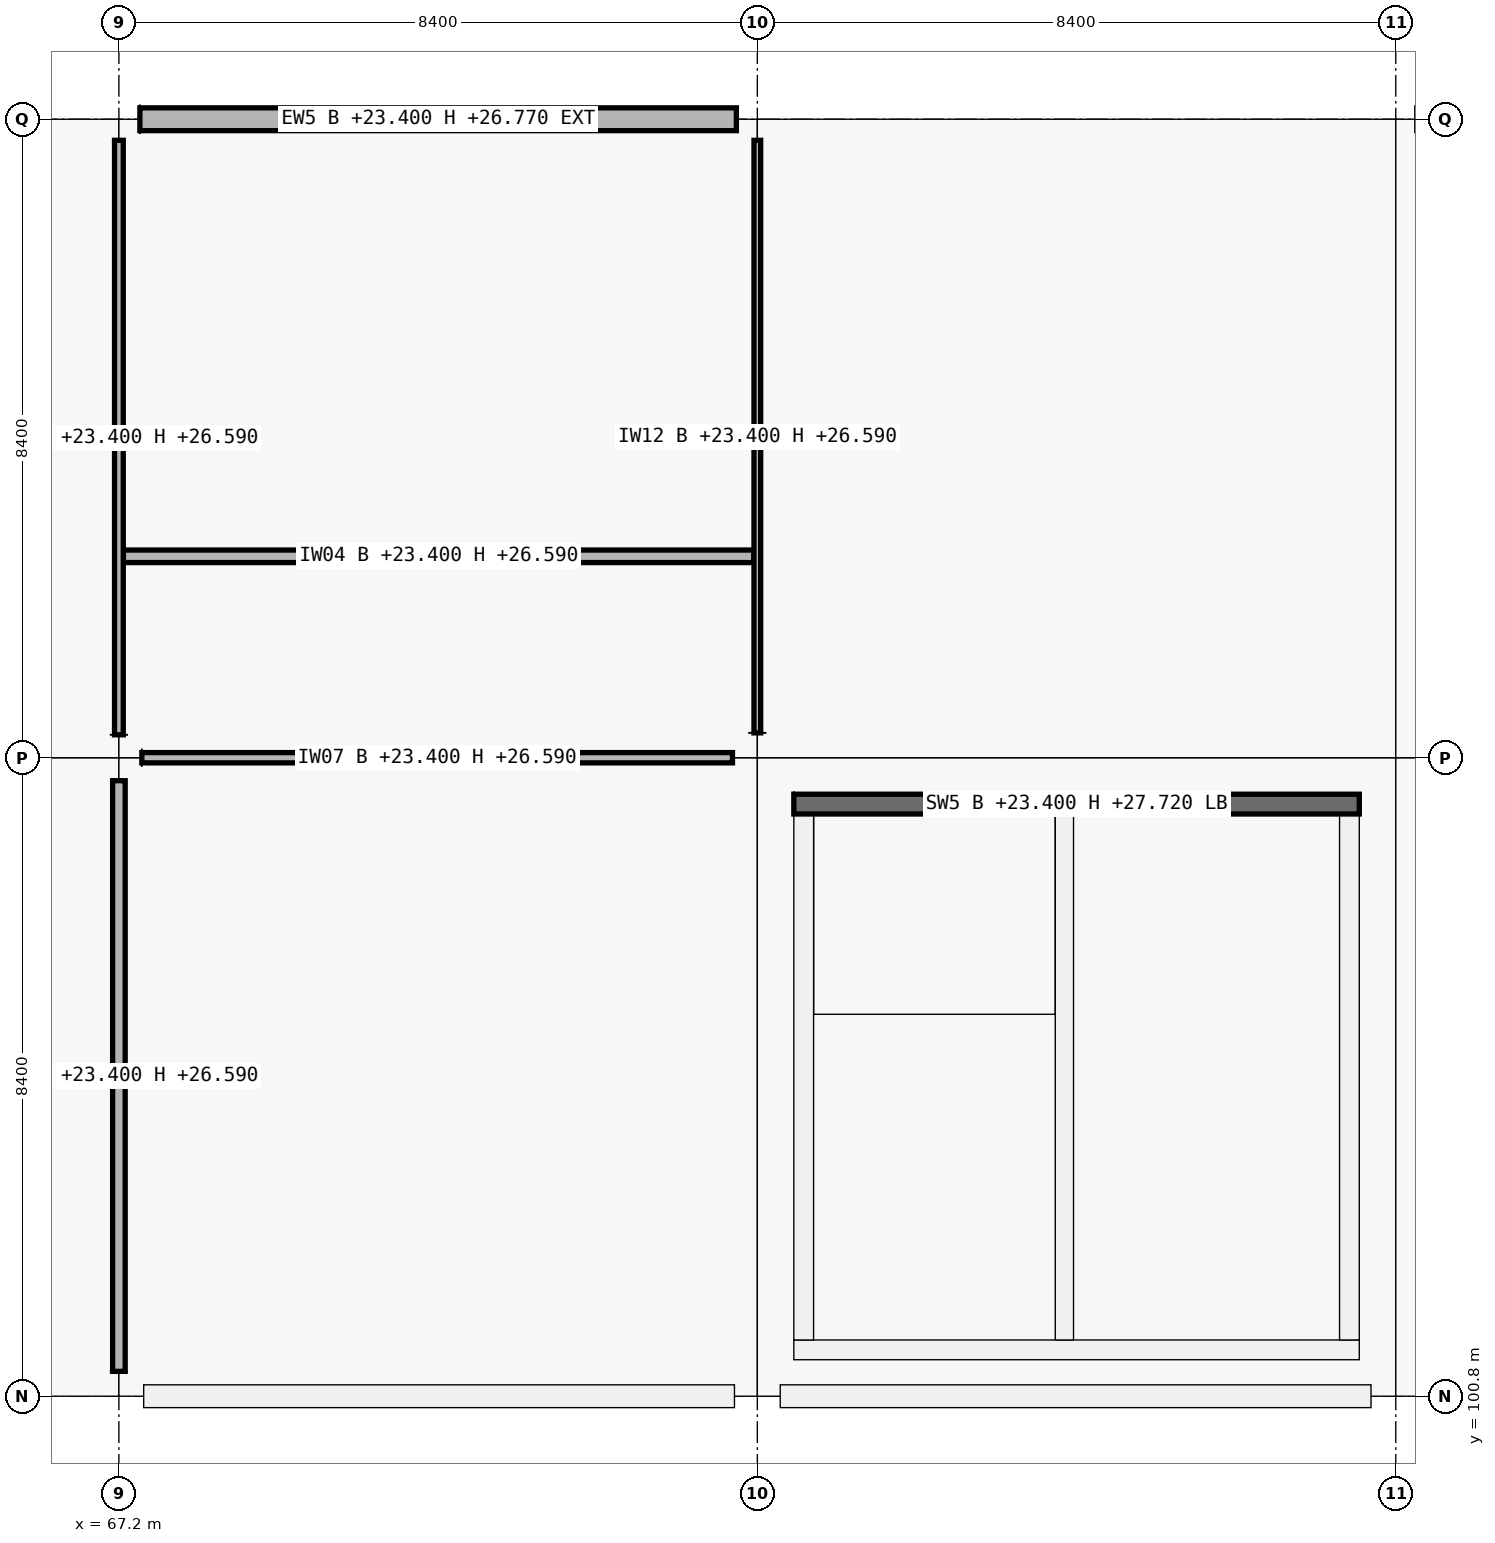
"""IFC4 building model, lengths in metres.
Left out: names, types, materials, properties, quantities, classifications, styles, units other than length and angle.
Written with IfcOpenShell. Run it as: python <this file> out.ifc"""

import sys

from ifc_helpers import new_model, si_unit, direction, frame, frame_2d, origin, origin_2d, place, context, subcontext, project, spatial, rectangle, extrude, element, fill, save


model = new_model("IFC4")
c1 = context("Model", 3, precision=1e-05, world=origin(), true_north=direction((0.0, 1.0)))
c2 = subcontext(c1, "Body", "Model", "MODEL_VIEW")
j1 = project(units=[si_unit("LENGTHUNIT", "METRE"), si_unit("PLANEANGLEUNIT", "RADIAN")], contexts=[c1])
p1 = place(None, origin())
s1 = spatial("IfcSite", under=j1, at=p1, CompositionType="ELEMENT")
p2 = place(p1, origin())
s2 = spatial("IfcBuilding", under=s1, at=p2, CompositionType="ELEMENT")
p3 = place(p2, frame((0.0, 0.0, 23.4)))
s3 = spatial("IfcBuildingStorey", under=s2, at=p3, CompositionType="ELEMENT", Elevation=23.4)
p4 = place(p3, frame((67.2, 100.8, 0.0), z_axis=(0.0, 0.0, 1.0), x_axis=(1.0, 0.0, 0.0)))
e1 = element("IfcColumn", 1, at=p4, inside=s3, PredefinedType="COLUMN", context=c2, shape_type="SweptSolid", body=[
    extrude(rectangle(XDim=0.65, YDim=0.65, at=origin_2d()), origin(), (0.0, 0.0, 1.0), 4.32),
])
p5 = place(p3, frame((67.2, 109.2, 0.0), z_axis=(0.0, 0.0, 1.0), x_axis=(1.0, 0.0, 0.0)))
e2 = element("IfcColumn", 2, at=p5, inside=s3, PredefinedType="COLUMN", context=c2, shape_type="SweptSolid", body=[
    extrude(rectangle(XDim=0.6, YDim=0.6, at=origin_2d()), origin(), (0.0, 0.0, 1.0), 4.32),
])
p6 = place(p3, frame((67.2, 117.6, 0.0), z_axis=(0.0, 0.0, 1.0), x_axis=(1.0, 0.0, 0.0)))
e3 = element("IfcColumn", 3, at=p6, inside=s3, PredefinedType="COLUMN", context=c2, shape_type="SweptSolid", body=[
    extrude(rectangle(XDim=0.55, YDim=0.55, at=origin_2d()), origin(), (0.0, 0.0, 1.0), 4.07),
])
p7 = place(p3, frame((75.6, 100.8, 0.0), z_axis=(0.0, 0.0, 1.0), x_axis=(1.0, 0.0, 0.0)))
e4 = element("IfcColumn", 4, at=p7, inside=s3, PredefinedType="COLUMN", context=c2, shape_type="SweptSolid", body=[
    extrude(rectangle(XDim=0.6, YDim=0.6, at=origin_2d()), origin(), (0.0, 0.0, 1.0), 4.32),
])
p8 = place(p3, frame((75.6, 109.2, 0.0), z_axis=(0.0, 0.0, 1.0), x_axis=(1.0, 0.0, 0.0)))
e5 = element("IfcColumn", 5, at=p8, inside=s3, PredefinedType="COLUMN", context=c2, shape_type="SweptSolid", body=[
    extrude(rectangle(XDim=0.65, YDim=0.65, at=origin_2d()), origin(), (0.0, 0.0, 1.0), 4.32),
])
p9 = place(p3, frame((75.6, 117.6, 0.0), z_axis=(0.0, 0.0, 1.0), x_axis=(1.0, 0.0, 0.0)))
e6 = element("IfcColumn", 6, at=p9, inside=s3, PredefinedType="COLUMN", context=c2, shape_type="SweptSolid", body=[
    extrude(rectangle(XDim=0.55, YDim=0.55, at=origin_2d()), origin(), (0.0, 0.0, 1.0), 4.07),
])
p10 = place(p3, frame((84.0, 100.8, 0.0), z_axis=(0.0, 0.0, 1.0), x_axis=(1.0, 0.0, 0.0)))
e7 = element("IfcColumn", 7, at=p10, inside=s3, PredefinedType="COLUMN", context=c2, shape_type="SweptSolid", body=[
    extrude(rectangle(XDim=0.65, YDim=0.65, at=origin_2d()), origin(), (0.0, 0.0, 1.0), 4.32),
])
p11 = place(p3, frame((84.0, 109.2, 0.0), z_axis=(0.0, 0.0, 1.0), x_axis=(1.0, 0.0, 0.0)))
e8 = element("IfcColumn", 8, at=p11, inside=s3, PredefinedType="COLUMN", context=c2, shape_type="SweptSolid", body=[
    extrude(rectangle(XDim=0.6, YDim=0.6, at=origin_2d()), origin(), (0.0, 0.0, 1.0), 4.32),
])
p12 = place(p3, frame((84.0, 117.6, 0.0), z_axis=(0.0, 0.0, 1.0), x_axis=(1.0, 0.0, 0.0)))
e9 = element("IfcColumn", 9, at=p12, inside=s3, PredefinedType="COLUMN", context=c2, shape_type="SweptSolid", body=[
    extrude(rectangle(XDim=0.55, YDim=0.55, at=origin_2d()), origin(), (0.0, 0.0, 1.0), 4.07),
])
p13 = place(p3, frame((75.299, 100.8, 0.0), z_axis=(0.0, 0.0, 1.0), x_axis=(-1.0, 0.0, 0.0)))
e10 = element("IfcWall", 10, at=p13, inside=s3, PredefinedType="SOLIDWALL", context=c2, shape_type="SweptSolid", body=[
    extrude(rectangle(XDim=7.773, YDim=0.3, at=frame_2d((3.887, 0.0))), origin(), (0.0, 0.0, 1.0), 3.37),
])
p14 = place(p13, frame((2.511, 0.0, 0.9)))
e11 = element("IfcOpeningElement", 11, at=p14, cuts=e10, PredefinedType="OPENING", context=c2, shape_type="SweptSolid", body=[
    extrude(rectangle(XDim=2.75, YDim=1.6, at=frame_2d((1.375, 0.8))), frame((0.0, 0.15, 0.0), z_axis=(0.0, -1.0, 0.0), x_axis=(1.0, 0.0, 0.0)), (0.0, 0.0, 1.0), 0.3),
])
p15 = place(p3, frame((67.476, 117.6, 0.0), z_axis=(0.0, 0.0, 1.0), x_axis=(1.0, 0.0, 0.0)))
e12 = element("IfcWall", 12, at=p15, inside=s3, PredefinedType="SOLIDWALL", context=c2, shape_type="SweptSolid", body=[
    extrude(rectangle(XDim=7.848, YDim=0.3, at=frame_2d((3.924, 0.0))), origin(), (0.0, 0.0, 1.0), 3.37),
])
p16 = place(p15, frame((3.149, 0.0, 0.9)))
e13 = element("IfcOpeningElement", 13, at=p16, cuts=e12, PredefinedType="OPENING", context=c2, shape_type="SweptSolid", body=[
    extrude(rectangle(XDim=1.55, YDim=1.6, at=frame_2d((0.775, 0.8))), frame((0.0, 0.15, 0.0), z_axis=(0.0, -1.0, 0.0), x_axis=(1.0, 0.0, 0.0)), (0.0, 0.0, 1.0), 0.3),
])
p17 = place(p3, frame((83.674, 100.8, 0.0), z_axis=(0.0, 0.0, 1.0), x_axis=(-1.0, 0.0, 0.0)))
e14 = element("IfcWall", 14, at=p17, inside=s3, PredefinedType="SOLIDWALL", context=c2, shape_type="SweptSolid", body=[
    extrude(rectangle(XDim=7.773, YDim=0.3, at=frame_2d((3.887, 0.0))), origin(), (0.0, 0.0, 1.0), 3.37),
])
p18 = place(p3, frame((83.52, 101.41, 0.0), z_axis=(0.0, 0.0, 1.0), x_axis=(-1.0, 0.0, 0.0)))
e15 = element("IfcWall", 15, at=p18, inside=s3, PredefinedType="SHEAR", context=c2, shape_type="SweptSolid", body=[
    extrude(rectangle(XDim=7.44, YDim=0.26, at=frame_2d((3.72, 0.0))), origin(), (0.0, 0.0, 1.0), 4.32),
])
p19 = place(p3, frame((76.21, 101.54, 0.0), z_axis=(0.0, 0.0, 1.0), x_axis=(0.0, 1.0, 0.0)))
e16 = element("IfcWall", 16, at=p19, inside=s3, PredefinedType="SHEAR", context=c2, shape_type="SweptSolid", body=[
    extrude(rectangle(XDim=6.92, YDim=0.26, at=frame_2d((3.46, 0.0))), origin(), (0.0, 0.0, 1.0), 4.32),
])
p20 = place(p3, frame((76.08, 108.59, 0.0), z_axis=(0.0, 0.0, 1.0), x_axis=(1.0, 0.0, 0.0)))
e17 = element("IfcWall", 17, at=p20, inside=s3, PredefinedType="SHEAR", context=c2, shape_type="SweptSolid", body=[
    extrude(rectangle(XDim=7.44, YDim=0.26, at=frame_2d((3.72, 0.0))), origin(), (0.0, 0.0, 1.0), 4.32),
])
p21 = place(p3, frame((83.39, 108.46, 0.0), z_axis=(0.0, 0.0, 1.0), x_axis=(0.0, -1.0, 0.0)))
e18 = element("IfcWall", 18, at=p21, inside=s3, PredefinedType="SHEAR", context=c2, shape_type="SweptSolid", body=[
    extrude(rectangle(XDim=6.92, YDim=0.26, at=frame_2d((3.46, 0.0))), origin(), (0.0, 0.0, 1.0), 4.32),
])
p22 = place(p21, frame((4.01, 0.0, 0.0)))
e19 = element("IfcOpeningElement", 19, at=p22, cuts=e18, PredefinedType="OPENING", context=c2, shape_type="SweptSolid", body=[
    extrude(rectangle(XDim=1.5, YDim=2.15, at=frame_2d((0.75, 1.075))), frame((0.0, 0.13, 0.0), z_axis=(0.0, -1.0, 0.0), x_axis=(1.0, 0.0, 0.0)), (0.0, 0.0, 1.0), 0.26),
])
p23 = place(p3, frame((79.64, 101.54, 0.0), z_axis=(0.0, 0.0, 1.0), x_axis=(0.0, 1.0, 0.0)))
e20 = element("IfcWall", 20, at=p23, inside=s3, PredefinedType="SHEAR", context=c2, shape_type="SweptSolid", body=[
    extrude(rectangle(XDim=6.92, YDim=0.24, at=frame_2d((3.46, 0.0))), origin(), (0.0, 0.0, 1.0), 4.32),
])
p24 = place(p23, frame((0.12, 0.0, 0.0)))
e21 = element("IfcOpeningElement", 21, at=p24, cuts=e20, PredefinedType="OPENING", context=c2, shape_type="SweptSolid", body=[
    extrude(rectangle(XDim=1.0, YDim=2.15, at=frame_2d((0.5, 1.075))), frame((0.0, 0.12, 0.0), z_axis=(0.0, -1.0, 0.0), x_axis=(1.0, 0.0, 0.0)), (0.0, 0.0, 1.0), 0.24),
])
p25 = place(p3, frame((67.502, 109.2, 0.0), z_axis=(0.0, 0.0, 1.0), x_axis=(1.0, 0.0, 0.0)))
e22 = element("IfcWall", 22, at=p25, inside=s3, PredefinedType="PARTITIONING", context=c2, shape_type="SweptSolid", body=[
    extrude(rectangle(XDim=7.771, YDim=0.135, at=frame_2d((3.885, 0.0))), origin(), (0.0, 0.0, 1.0), 3.19),
])
p26 = place(p3, frame((67.2, 101.127, 0.0), z_axis=(0.0, 0.0, 1.0), x_axis=(0.0, 1.0, 0.0)))
e23 = element("IfcWall", 23, at=p26, inside=s3, PredefinedType="PARTITIONING", context=c2, shape_type="SweptSolid", body=[
    extrude(rectangle(XDim=7.771, YDim=0.165, at=frame_2d((3.885, 0.0))), origin(), (0.0, 0.0, 1.0), 3.19),
])
p27 = place(p26, frame((3.415, 0.0, 0.0)))
e24 = element("IfcOpeningElement", 24, at=p27, cuts=e23, PredefinedType="OPENING", context=c2, shape_type="SweptSolid", body=[
    extrude(rectangle(XDim=0.94, YDim=2.15, at=frame_2d((0.47, 1.075))), frame((0.0, 0.083, 0.0), z_axis=(0.0, -1.0, 0.0), x_axis=(1.0, 0.0, 0.0)), (0.0, 0.0, 1.0), 0.165),
])
p28 = place(p3, frame((67.2, 109.502, 0.0), z_axis=(0.0, 0.0, 1.0), x_axis=(0.0, 1.0, 0.0)))
e25 = element("IfcWall", 25, at=p28, inside=s3, PredefinedType="PARTITIONING", context=c2, shape_type="SweptSolid", body=[
    extrude(rectangle(XDim=7.821, YDim=0.115, at=frame_2d((3.911, 0.0))), origin(), (0.0, 0.0, 1.0), 3.19),
])
p29 = place(p28, frame((0.693, 0.0, 0.0)))
e26 = element("IfcOpeningElement", 26, at=p29, cuts=e25, PredefinedType="OPENING", context=c2, shape_type="SweptSolid", body=[
    extrude(rectangle(XDim=0.94, YDim=2.08, at=frame_2d((0.47, 1.04))), frame((0.0, 0.058, 0.0), z_axis=(0.0, -1.0, 0.0), x_axis=(1.0, 0.0, 0.0)), (0.0, 0.0, 1.0), 0.115),
])
p30 = place(p28, frame((4.603, 0.0, 0.0)))
e27 = element("IfcOpeningElement", 27, at=p30, cuts=e25, PredefinedType="OPENING", context=c2, shape_type="SweptSolid", body=[
    extrude(rectangle(XDim=0.96, YDim=2.1, at=frame_2d((0.48, 1.05))), frame((0.0, 0.058, 0.0), z_axis=(0.0, -1.0, 0.0), x_axis=(1.0, 0.0, 0.0)), (0.0, 0.0, 1.0), 0.115),
])
p31 = place(p3, frame((75.6, 109.527, 0.0), z_axis=(0.0, 0.0, 1.0), x_axis=(0.0, 1.0, 0.0)))
e28 = element("IfcWall", 28, at=p31, inside=s3, PredefinedType="PARTITIONING", context=c2, shape_type="SweptSolid", body=[
    extrude(rectangle(XDim=7.796, YDim=0.088, at=frame_2d((3.898, 0.0))), origin(), (0.0, 0.0, 1.0), 3.19),
])
p32 = place(p3, frame((67.26, 111.85, 0.0), z_axis=(0.0, 0.0, 1.0), x_axis=(1.0, 0.0, 0.0)))
e29 = element("IfcWall", 29, at=p32, inside=s3, PredefinedType="PARTITIONING", context=c2, shape_type="SweptSolid", body=[
    extrude(rectangle(XDim=8.294, YDim=0.165, at=frame_2d((4.147, 0.0))), origin(), (0.0, 0.0, 1.0), 3.19),
])
p33 = place(p14, origin())
e30 = element("IfcWindow", 30, at=p33, inside=s3, PartitioningType="SINGLE_PANEL", PredefinedType="WINDOW", context=c2, shape_type="SweptSolid", body=[
    extrude(rectangle(XDim=2.75, YDim=1.6, at=frame_2d((1.375, 0.8))), frame((0.0, 0.03, 0.0), z_axis=(0.0, -1.0, 0.0), x_axis=(1.0, 0.0, 0.0)), (0.0, 0.0, 1.0), 0.06),
])
fill(e11, e30)
p34 = place(p16, origin())
e31 = element("IfcWindow", 31, at=p34, inside=s3, PartitioningType="SINGLE_PANEL", PredefinedType="WINDOW", context=c2, shape_type="SweptSolid", body=[
    extrude(rectangle(XDim=1.55, YDim=1.6, at=frame_2d((0.775, 0.8))), frame((0.0, 0.03, 0.0), z_axis=(0.0, -1.0, 0.0), x_axis=(1.0, 0.0, 0.0)), (0.0, 0.0, 1.0), 0.06),
])
fill(e13, e31)
p35 = place(p24, origin())
e32 = element("IfcDoor", 32, at=p35, inside=s3, OperationType="SINGLE_SWING_RIGHT", PredefinedType="DOOR", context=c2, shape_type="SweptSolid", body=[
    extrude(rectangle(XDim=1.0, YDim=2.15, at=frame_2d((0.5, 1.075))), frame((0.0, 0.025, 0.0), z_axis=(0.0, -1.0, 0.0), x_axis=(1.0, 0.0, 0.0)), (0.0, 0.0, 1.0), 0.05),
])
fill(e21, e32)
p36 = place(p22, origin())
e33 = element("IfcDoor", 33, at=p36, inside=s3, OperationType="DOUBLE_DOOR_SINGLE_SWING", PredefinedType="DOOR", context=c2, shape_type="SweptSolid", body=[
    extrude(rectangle(XDim=1.5, YDim=2.15, at=frame_2d((0.75, 1.075))), frame((0.0, 0.025, 0.0), z_axis=(0.0, -1.0, 0.0), x_axis=(1.0, 0.0, 0.0)), (0.0, 0.0, 1.0), 0.05),
])
fill(e19, e33)
p37 = place(p29, origin())
e34 = element("IfcDoor", 34, at=p37, inside=s3, OperationType="SINGLE_SWING_LEFT", PredefinedType="DOOR", context=c2, shape_type="SweptSolid", body=[
    extrude(rectangle(XDim=0.94, YDim=2.08, at=frame_2d((0.47, 1.04))), frame((0.0, 0.025, 0.0), z_axis=(0.0, -1.0, 0.0), x_axis=(1.0, 0.0, 0.0)), (0.0, 0.0, 1.0), 0.05),
])
fill(e26, e34)
p38 = place(p30, origin())
e35 = element("IfcDoor", 35, at=p38, inside=s3, OperationType="SINGLE_SWING_RIGHT", PredefinedType="DOOR", context=c2, shape_type="SweptSolid", body=[
    extrude(rectangle(XDim=0.96, YDim=2.1, at=frame_2d((0.48, 1.05))), frame((0.0, 0.025, 0.0), z_axis=(0.0, -1.0, 0.0), x_axis=(1.0, 0.0, 0.0)), (0.0, 0.0, 1.0), 0.05),
])
fill(e27, e35)
p39 = place(p27, origin())
e36 = element("IfcDoor", 36, at=p39, inside=s3, OperationType="SINGLE_SWING_LEFT", PredefinedType="DOOR", context=c2, shape_type="SweptSolid", body=[
    extrude(rectangle(XDim=0.94, YDim=2.15, at=frame_2d((0.47, 1.075))), frame((0.0, 0.025, 0.0), z_axis=(0.0, -1.0, 0.0), x_axis=(1.0, 0.0, 0.0)), (0.0, 0.0, 1.0), 0.05),
])
fill(e24, e36)
save(model, sys.argv[1])
